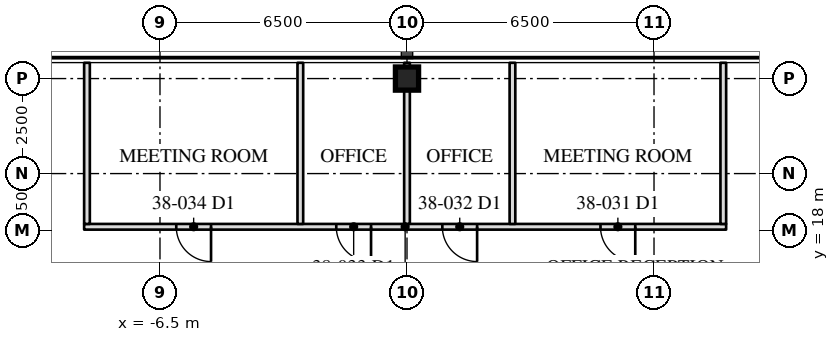
"""IFC4 building model, lengths in metres.
Left out: names, types, materials, properties, quantities, classifications, styles, units other than length and angle.
Written with IfcOpenShell. Run it as: python <this file> out.ifc"""

import sys

from ifc_helpers import new_model, si_unit, direction, frame, frame_2d, origin, origin_2d, place, context, subcontext, project, spatial, rectangle, hollow_rectangle, extrude, element, fill, save


model = new_model("IFC4")
c1 = context("Model", 3, precision=1e-05, world=origin(), true_north=direction((0.0, 1.0)))
c2 = subcontext(c1, "Body", "Model", "MODEL_VIEW")
j1 = project(units=[si_unit("LENGTHUNIT", "METRE"), si_unit("PLANEANGLEUNIT", "RADIAN")], contexts=[c1])
p1 = place(None, origin())
s1 = spatial("IfcSite", under=j1, at=p1, CompositionType="ELEMENT")
p2 = place(p1, origin())
s2 = spatial("IfcBuilding", under=s1, at=p2, CompositionType="ELEMENT")
p3 = place(p2, frame((0.0, 0.0, 162.3)))
s3 = spatial("IfcBuildingStorey", under=s2, at=p3, CompositionType="ELEMENT", Elevation=162.3)
p4 = place(p3, frame((0.0, 22.0, 0.0), z_axis=(0.0, 0.0, 1.0), x_axis=(1.0, 0.0, 0.0)))
e1 = element("IfcColumn", 1, at=p4, inside=s3, PredefinedType="COLUMN", context=c2, shape_type="SweptSolid", body=[
    extrude(hollow_rectangle(XDim=0.61, YDim=0.61, WallThickness=0.076, at=origin_2d()), origin(), (0.0, 0.0, 1.0), 4.1),
])
p5 = place(p3, frame((8.398, 18.1, 0.0), z_axis=(0.0, 0.0, 1.0), x_axis=(-1.0, 0.0, 0.0)))
e2 = element("IfcWall", 2, at=p5, inside=s3, PredefinedType="PARTITIONING", context=c2, shape_type="SweptSolid", body=[
    extrude(rectangle(XDim=16.894, YDim=0.15, at=frame_2d((8.447, 0.0))), origin(), (0.0, 0.0, 1.0), 3.91),
])
p6 = place(p5, frame((2.392, 0.0, 0.0)))
e3 = element("IfcOpeningElement", 3, at=p6, cuts=e2, PredefinedType="OPENING", context=c2, shape_type="SweptSolid", body=[
    extrude(rectangle(XDim=0.915, YDim=2.134, at=frame_2d((0.458, 1.067))), frame((0.0, 0.085, 0.0), z_axis=(0.0, -1.0, 0.0), x_axis=(1.0, 0.0, 0.0)), (0.0, 0.0, 1.0), 0.17),
])
p7 = place(p5, frame((6.553, 0.0, 0.0)))
e4 = element("IfcOpeningElement", 4, at=p7, cuts=e2, PredefinedType="OPENING", context=c2, shape_type="SweptSolid", body=[
    extrude(rectangle(XDim=0.915, YDim=2.134, at=frame_2d((0.458, 1.067))), frame((0.0, 0.085, 0.0), z_axis=(0.0, -1.0, 0.0), x_axis=(1.0, 0.0, 0.0)), (0.0, 0.0, 1.0), 0.17),
])
p8 = place(p5, frame((9.344, 0.0, 0.0)))
e5 = element("IfcOpeningElement", 5, at=p8, cuts=e2, PredefinedType="OPENING", context=c2, shape_type="SweptSolid", body=[
    extrude(rectangle(XDim=0.915, YDim=2.134, at=frame_2d((0.458, 1.067))), frame((0.0, 0.085, 0.0), z_axis=(0.0, -1.0, 0.0), x_axis=(1.0, 0.0, 0.0)), (0.0, 0.0, 1.0), 0.17),
])
p9 = place(p5, frame((13.554, 0.0, 0.0)))
e6 = element("IfcOpeningElement", 6, at=p9, cuts=e2, PredefinedType="OPENING", context=c2, shape_type="SweptSolid", body=[
    extrude(rectangle(XDim=0.915, YDim=2.134, at=frame_2d((0.458, 1.067))), frame((0.0, 0.085, 0.0), z_axis=(0.0, -1.0, 0.0), x_axis=(1.0, 0.0, 0.0)), (0.0, 0.0, 1.0), 0.17),
])
for number, where, z_axis, x_axis in (
    (7, (8.323, 18.175, 0.0), (0.0, 0.0, 1.0), (0.0, 1.0, 0.0)),
    (8, (2.775, 18.175, 0.0), (0.0, 0.0, 1.0), (0.0, 1.0, 0.0)),
):
    element("IfcWall", number, at=place(p3, frame(where, z_axis=z_axis, x_axis=x_axis)), inside=s3, PredefinedType="PARTITIONING", context=c2, shape_type="SweptSolid", body=[
        extrude(rectangle(XDim=4.24, YDim=0.15, at=frame_2d((2.12, 0.0))), origin(), (0.0, 0.0, 1.0), 3.91),
    ])
p10 = place(p3, frame((0.0, 18.175, 0.0), z_axis=(0.0, 0.0, 1.0), x_axis=(0.0, 1.0, 0.0)))
e9 = element("IfcWall", 9, at=p10, inside=s3, PredefinedType="PARTITIONING", context=c2, shape_type="SweptSolid", body=[
    extrude(rectangle(XDim=4.24, YDim=0.15, at=frame_2d((2.12, 0.0))), origin(), (0.0, 0.0, 1.0), 3.326),
])
for number, where, z_axis, x_axis in (
    (10, (-2.807, 18.175, 0.0), (0.0, 0.0, 1.0), (0.0, 1.0, 0.0)),
    (11, (-8.421, 18.175, 0.0), (0.0, 0.0, 1.0), (0.0, 1.0, 0.0)),
):
    element("IfcWall", number, at=place(p3, frame(where, z_axis=z_axis, x_axis=x_axis)), inside=s3, PredefinedType="PARTITIONING", context=c2, shape_type="SweptSolid", body=[
        extrude(rectangle(XDim=4.24, YDim=0.15, at=frame_2d((2.12, 0.0))), origin(), (0.0, 0.0, 1.0), 3.91),
    ])
p11 = place(p6, origin())
e12 = element("IfcDoor", 12, at=p11, inside=s3, OperationType="SINGLE_SWING_LEFT", PredefinedType="DOOR", context=c2, shape_type="SweptSolid", body=[
    extrude(rectangle(XDim=0.915, YDim=2.134, at=frame_2d((0.458, 1.067))), frame((0.0, 0.025, 0.0), z_axis=(0.0, -1.0, 0.0), x_axis=(1.0, 0.0, 0.0)), (0.0, 0.0, 1.0), 0.05),
])
fill(e3, e12)
p12 = place(p7, origin())
e13 = element("IfcDoor", 13, at=p12, inside=s3, OperationType="SINGLE_SWING_LEFT", PredefinedType="DOOR", context=c2, shape_type="SweptSolid", body=[
    extrude(rectangle(XDim=0.915, YDim=2.134, at=frame_2d((0.458, 1.067))), frame((0.0, 0.025, 0.0), z_axis=(0.0, -1.0, 0.0), x_axis=(1.0, 0.0, 0.0)), (0.0, 0.0, 1.0), 0.05),
])
fill(e4, e13)
p13 = place(p8, origin())
e14 = element("IfcDoor", 14, at=p13, inside=s3, OperationType="SINGLE_SWING_LEFT", PredefinedType="DOOR", context=c2, shape_type="SweptSolid", body=[
    extrude(rectangle(XDim=0.915, YDim=2.134, at=frame_2d((0.458, 1.067))), frame((0.0, 0.025, 0.0), z_axis=(0.0, -1.0, 0.0), x_axis=(1.0, 0.0, 0.0)), (0.0, 0.0, 1.0), 0.05),
])
fill(e5, e14)
p14 = place(p9, origin())
e15 = element("IfcDoor", 15, at=p14, inside=s3, OperationType="SINGLE_SWING_LEFT", PredefinedType="DOOR", context=c2, shape_type="SweptSolid", body=[
    extrude(rectangle(XDim=0.915, YDim=2.134, at=frame_2d((0.458, 1.067))), frame((0.0, 0.025, 0.0), z_axis=(0.0, -1.0, 0.0), x_axis=(1.0, 0.0, 0.0)), (0.0, 0.0, 1.0), 0.05),
])
fill(e6, e15)
save(model, sys.argv[1])
